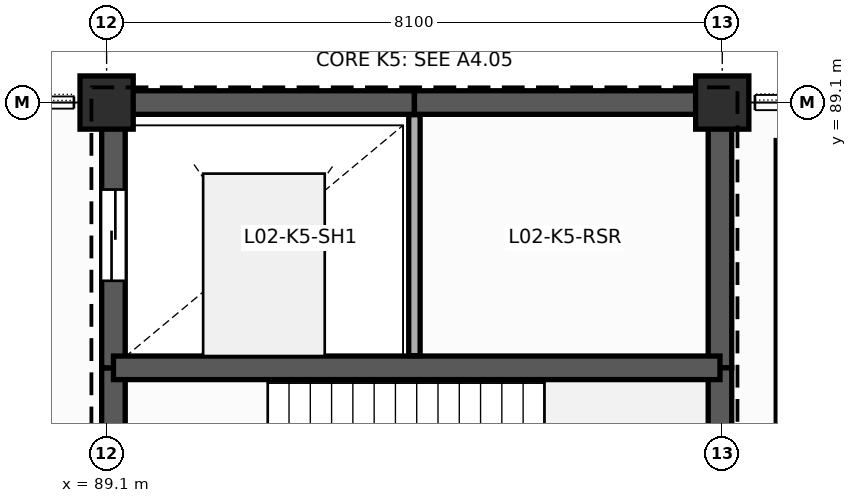
"""IFC4 building model, lengths in metres.
Left out: names, types, materials, properties, quantities, classifications, styles, units other than length and angle.
Written with IfcOpenShell. Run it as: python <this file> out.ifc"""

import sys

from ifc_helpers import new_model, si_unit, direction, frame, frame_2d, origin, origin_2d, place, context, subcontext, project, spatial, rectangle, extrude, element, fill, save


model = new_model("IFC4")
c1 = context("Model", 3, precision=1e-05, world=origin(), true_north=direction((0.0, 1.0)))
c2 = subcontext(c1, "Body", "Model", "MODEL_VIEW")
j1 = project(units=[si_unit("LENGTHUNIT", "METRE"), si_unit("PLANEANGLEUNIT", "RADIAN")], contexts=[c1])
p1 = place(None, origin())
s1 = spatial("IfcSite", under=j1, at=p1, CompositionType="ELEMENT")
p2 = place(p1, origin())
s2 = spatial("IfcBuilding", under=s1, at=p2, CompositionType="ELEMENT")
p3 = place(p2, frame((0.0, 0.0, 10.2)))
s3 = spatial("IfcBuildingStorey", under=s2, at=p3, CompositionType="ELEMENT", Elevation=10.2)
for number, where, z_axis, x_axis in (
    (1, (89.1, 89.1, 0.0), (0.0, 0.0, 1.0), (1.0, 0.0, 0.0)),
    (2, (97.2, 89.1, 0.0), (0.0, 0.0, 1.0), (1.0, 0.0, 0.0)),
):
    element("IfcColumn", number, at=place(p3, frame(where, z_axis=z_axis, x_axis=x_axis)), inside=s3, PredefinedType="COLUMN", context=c2, shape_type="SweptSolid", body=[
        extrude(rectangle(XDim=0.7, YDim=0.7, at=origin_2d()), origin(), (0.0, 0.0, 1.0), 4.8),
    ])
p4 = place(p3, frame((89.19, 81.25, 0.0), z_axis=(0.0, 0.0, 1.0), x_axis=(0.0, 1.0, 0.0)))
e3 = element("IfcWall", 3, at=p4, inside=s3, PredefinedType="SHEAR", context=c2, shape_type="SweptSolid", body=[
    extrude(rectangle(XDim=4.36, YDim=0.31, at=frame_2d((2.18, 0.0))), origin(), (0.0, 0.0, 1.0), 4.8),
])
p5 = place(p4, frame((1.35, 0.0, 0.0)))
e4 = element("IfcOpeningElement", 4, at=p5, cuts=e3, PredefinedType="OPENING", context=c2, shape_type="SweptSolid", body=[
    extrude(rectangle(XDim=1.2, YDim=2.25, at=frame_2d((0.6, 1.125))), frame((0.0, 0.165, 0.0), z_axis=(0.0, -1.0, 0.0), x_axis=(1.0, 0.0, 0.0)), (0.0, 0.0, 1.0), 0.33),
])
p6 = place(p3, frame((89.19, 85.61, 0.0), z_axis=(0.0, 0.0, 1.0), x_axis=(0.0, 1.0, 0.0)))
e5 = element("IfcWall", 5, at=p6, inside=s3, PredefinedType="SHEAR", context=c2, shape_type="SweptSolid", body=[
    extrude(rectangle(XDim=3.49, YDim=0.31, at=frame_2d((1.745, 0.0))), origin(), (0.0, 0.0, 1.0), 4.8),
])
p7 = place(p6, frame((1.145, 0.0, 0.0)))
e6 = element("IfcOpeningElement", 6, at=p7, cuts=e5, PredefinedType="OPENING", context=c2, shape_type="SweptSolid", body=[
    extrude(rectangle(XDim=1.2, YDim=2.2, at=frame_2d((0.6, 1.1))), frame((0.0, 0.165, 0.0), z_axis=(0.0, -1.0, 0.0), x_axis=(1.0, 0.0, 0.0)), (0.0, 0.0, 1.0), 0.33),
])
p8 = place(p3, frame((89.19, 89.1, 0.0), z_axis=(0.0, 0.0, 1.0), x_axis=(1.0, 0.0, 0.0)))
e7 = element("IfcWall", 7, at=p8, inside=s3, PredefinedType="SHEAR", context=c2, shape_type="SweptSolid", body=[
    extrude(rectangle(XDim=3.96, YDim=0.31, at=frame_2d((1.98, 0.0))), origin(), (0.0, 0.0, 1.0), 4.8),
])
p9 = place(p3, frame((93.15, 89.1, 0.0), z_axis=(0.0, 0.0, 1.0), x_axis=(1.0, 0.0, 0.0)))
e8 = element("IfcWall", 8, at=p9, inside=s3, PredefinedType="SHEAR", context=c2, shape_type="SweptSolid", body=[
    extrude(rectangle(XDim=4.02, YDim=0.31, at=frame_2d((2.01, 0.0))), origin(), (0.0, 0.0, 1.0), 4.8),
])
p10 = place(p3, frame((97.17, 89.1, 0.0), z_axis=(0.0, 0.0, 1.0), x_axis=(0.0, -1.0, 0.0)))
e9 = element("IfcWall", 9, at=p10, inside=s3, PredefinedType="SHEAR", context=c2, shape_type="SweptSolid", body=[
    extrude(rectangle(XDim=3.49, YDim=0.31, at=frame_2d((1.745, 0.0))), origin(), (0.0, 0.0, 1.0), 4.8),
])
p11 = place(p3, frame((97.17, 85.61, 0.0), z_axis=(0.0, 0.0, 1.0), x_axis=(0.0, -1.0, 0.0)))
e10 = element("IfcWall", 10, at=p11, inside=s3, PredefinedType="SHEAR", context=c2, shape_type="SweptSolid", body=[
    extrude(rectangle(XDim=4.36, YDim=0.31, at=frame_2d((2.18, 0.0))), origin(), (0.0, 0.0, 1.0), 4.8),
])
p12 = place(p3, frame((89.19, 85.61, 0.0), z_axis=(0.0, 0.0, 1.0), x_axis=(1.0, 0.0, 0.0)))
e11 = element("IfcWall", 11, at=p12, inside=s3, PredefinedType="SHEAR", context=c2, shape_type="SweptSolid", body=[
    extrude(rectangle(XDim=7.98, YDim=0.31, at=frame_2d((3.99, 0.0))), origin(), (0.0, 0.0, 1.0), 4.8),
])
p13 = place(p3, frame((93.15, 85.77, 0.0), z_axis=(0.0, 0.0, 1.0), x_axis=(0.0, 1.0, 0.0)))
e12 = element("IfcWall", 12, at=p13, inside=s3, PredefinedType="PLUMBINGWALL", context=c2, shape_type="SweptSolid", body=[
    extrude(rectangle(XDim=3.17, YDim=0.15, at=frame_2d((1.585, 0.0))), origin(), (0.0, 0.0, 1.0), 4.45),
])
p14 = place(p3, frame((98.0, 81.4, 0.0), z_axis=(0.0, 0.0, 1.0), x_axis=(0.0, 1.0, 0.0)))
e13 = element("IfcWall", 13, at=p14, inside=s3, PredefinedType="PARTITIONING", context=c2, shape_type="SweptSolid", body=[
    extrude(rectangle(XDim=7.2, YDim=0.18, at=frame_2d((3.6, 0.0))), origin(), (0.0, 0.0, 1.0), 4.52),
])
p15 = place(p7, origin())
e14 = element("IfcDoor", 14, at=p15, inside=s3, OperationType="SLIDING_TO_LEFT", PredefinedType="DOOR", context=c2, shape_type="SweptSolid", body=[
    extrude(rectangle(XDim=1.2, YDim=2.2, at=frame_2d((0.6, 1.1))), frame((0.0, 0.025, 0.0), z_axis=(0.0, -1.0, 0.0), x_axis=(1.0, 0.0, 0.0)), (0.0, 0.0, 1.0), 0.05),
])
fill(e6, e14)
save(model, sys.argv[1])
